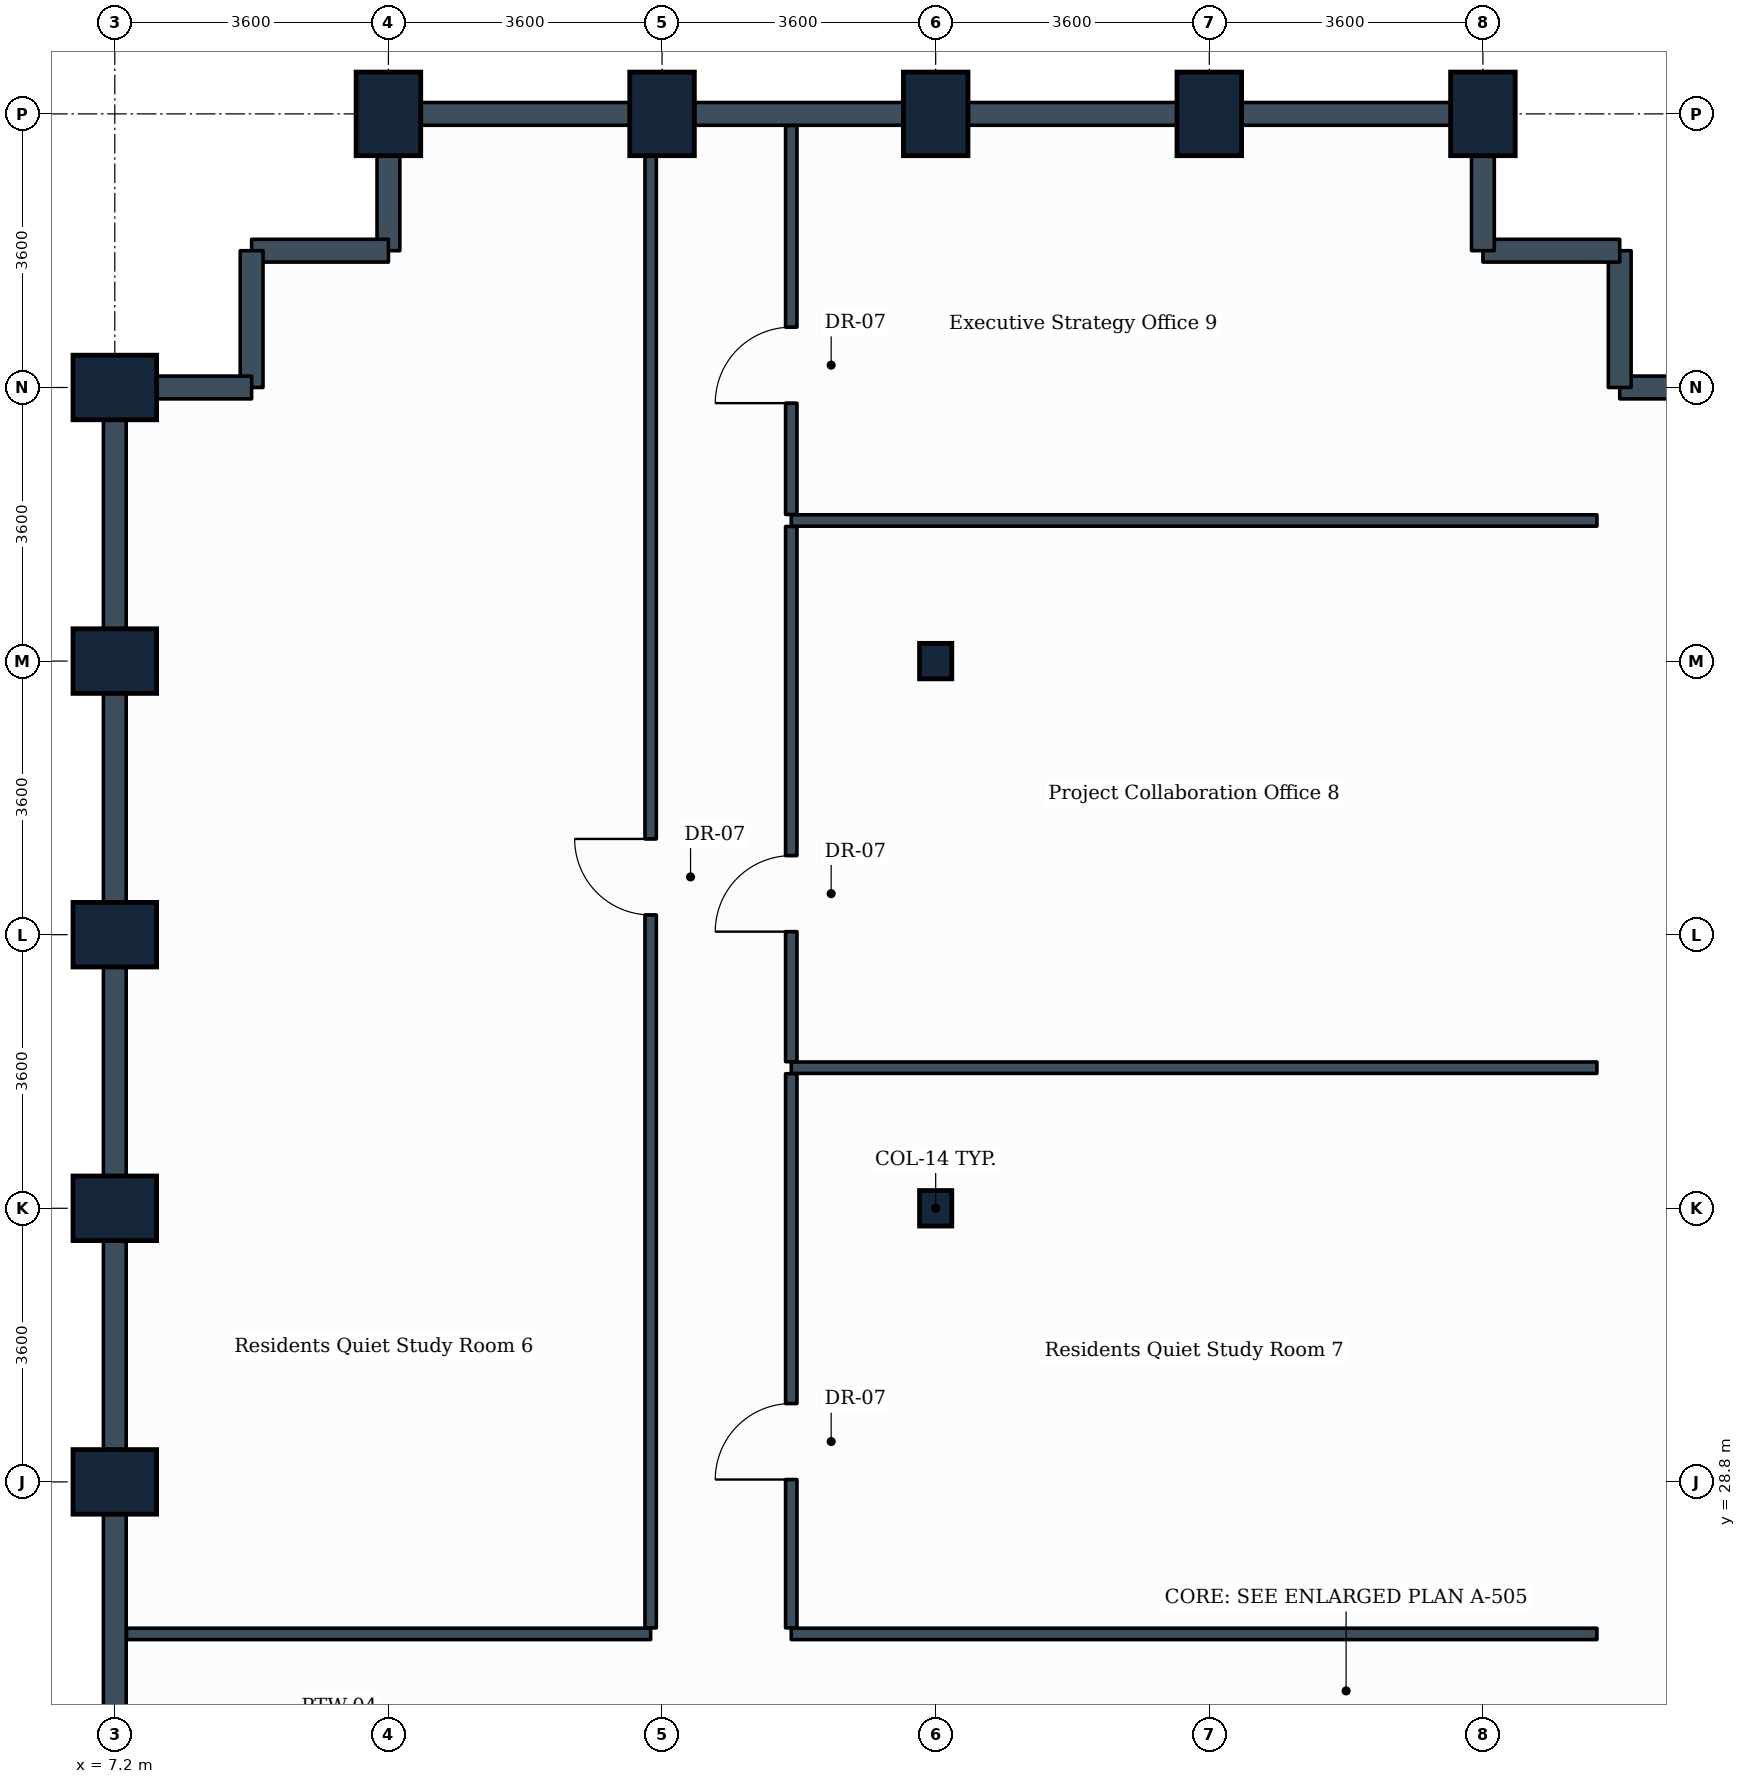
"""IFC4 building model, lengths in metres.
Left out: names, types, materials, properties, quantities, classifications, styles, units other than length and angle.
Written with IfcOpenShell. Run it as: python <this file> out.ifc"""

import sys

from ifc_helpers import new_model, si_unit, direction, frame, frame_2d, origin, origin_2d, place, context, subcontext, project, spatial, rectangle, i_section, extrude, element, fill, save


model = new_model("IFC4")
c1 = context("Model", 3, precision=1e-05, world=origin(), true_north=direction((0.0, 1.0)))
c2 = subcontext(c1, "Body", "Model", "MODEL_VIEW")
j1 = project(units=[si_unit("LENGTHUNIT", "METRE"), si_unit("PLANEANGLEUNIT", "RADIAN")], contexts=[c1])
p1 = place(None, origin())
s1 = spatial("IfcSite", under=j1, at=p1, CompositionType="ELEMENT")
p2 = place(p1, origin())
s2 = spatial("IfcBuilding", under=s1, at=p2, CompositionType="ELEMENT")
p3 = place(p2, frame((0.0, 0.0, 107.4)))
s3 = spatial("IfcBuildingStorey", under=s2, at=p3, CompositionType="ELEMENT", Elevation=107.4)
for number, where, z_axis, x_axis in (
    (1, (7.2, 28.8, 0.0), (0.0, 0.0, 1.0), (0.0, 1.0, 0.0)),
    (2, (7.2, 32.4, 0.0), (0.0, 0.0, 1.0), (0.0, 1.0, 0.0)),
    (3, (7.2, 36.0, 0.0), (0.0, 0.0, 1.0), (0.0, 1.0, 0.0)),
    (4, (7.2, 39.6, 0.0), (0.0, 0.0, 1.0), (0.0, 1.0, 0.0)),
    (5, (7.2, 43.2, 0.0), (0.0, 0.0, 1.0), (0.0, 1.0, 0.0)),
    (6, (10.8, 46.8, 0.0), (0.0, 0.0, 1.0), (1.0, 0.0, 0.0)),
    (7, (14.4, 46.8, 0.0), (0.0, 0.0, 1.0), (1.0, 0.0, 0.0)),
):
    element("IfcColumn", number, at=place(p3, frame(where, z_axis=z_axis, x_axis=x_axis)), inside=s3, PredefinedType="COLUMN", context=c2, shape_type="SweptSolid", body=[
        extrude(rectangle(XDim=0.85, YDim=1.1, at=origin_2d()), origin(), (0.0, 0.0, 1.0), 3.9),
    ])
for number, where, z_axis, x_axis in (
    (8, (18.0, 32.4, 0.0), (0.0, 0.0, 1.0), (1.0, 0.0, 0.0)),
    (9, (18.0, 39.6, 0.0), (0.0, 0.0, 1.0), (1.0, 0.0, 0.0)),
):
    element("IfcColumn", number, at=place(p3, frame(where, z_axis=z_axis, x_axis=x_axis)), inside=s3, PredefinedType="COLUMN", context=c2, shape_type="SweptSolid", body=[
        extrude(i_section(OverallWidth=0.424, OverallDepth=0.467, WebThickness=0.033, FlangeThickness=0.053, FilletRadius=0.015, at=origin_2d()), origin(), (0.0, 0.0, 1.0), 3.9),
    ])
for number, where, z_axis, x_axis in (
    (10, (18.0, 46.8, 0.0), (0.0, 0.0, 1.0), (1.0, 0.0, 0.0)),
    (11, (21.6, 46.8, 0.0), (0.0, 0.0, 1.0), (1.0, 0.0, 0.0)),
    (12, (25.2, 46.8, 0.0), (0.0, 0.0, 1.0), (1.0, 0.0, 0.0)),
):
    element("IfcColumn", number, at=place(p3, frame(where, z_axis=z_axis, x_axis=x_axis)), inside=s3, PredefinedType="COLUMN", context=c2, shape_type="SweptSolid", body=[
        extrude(rectangle(XDim=0.85, YDim=1.1, at=origin_2d()), origin(), (0.0, 0.0, 1.0), 3.9),
    ])
p4 = place(p3, frame((27.0, 43.2, 0.0), z_axis=(0.0, 0.0, 1.0), x_axis=(1.0, 0.0, 0.0)))
e13 = element("IfcWall", 13, at=p4, inside=s3, PredefinedType="STANDARD", context=c2, shape_type="SweptSolid", body=[
    extrude(rectangle(XDim=1.8, YDim=0.3, at=frame_2d((0.9, 0.0))), origin(), (0.0, 0.0, 1.0), 2.93),
])
for number, where, z_axis, x_axis in (
    (14, (27.0, 43.2, 0.0), (0.0, 0.0, 1.0), (0.0, 1.0, 0.0)),
    (15, (25.2, 45.0, 0.0), (0.0, 0.0, 1.0), (1.0, 0.0, 0.0)),
):
    element("IfcWall", number, at=place(p3, frame(where, z_axis=z_axis, x_axis=x_axis)), inside=s3, PredefinedType="STANDARD", context=c2, shape_type="SweptSolid", body=[
        extrude(rectangle(XDim=1.8, YDim=0.3, at=frame_2d((0.9, 0.0))), origin(), (0.0, 0.0, 1.0), 3.635),
    ])
p5 = place(p3, frame((25.2, 45.0, 0.0), z_axis=(0.0, 0.0, 1.0), x_axis=(0.0, 1.0, 0.0)))
e16 = element("IfcWall", 16, at=p5, inside=s3, PredefinedType="STANDARD", context=c2, shape_type="SweptSolid", body=[
    extrude(rectangle(XDim=1.8, YDim=0.3, at=frame_2d((0.9, 0.0))), origin(), (0.0, 0.0, 1.0), 2.93),
])
p6 = place(p3, frame((21.6, 46.8, 0.0), z_axis=(0.0, 0.0, 1.0), x_axis=(1.0, 0.0, 0.0)))
e17 = element("IfcWall", 17, at=p6, inside=s3, PredefinedType="STANDARD", context=c2, shape_type="SweptSolid", body=[
    extrude(rectangle(XDim=3.6, YDim=0.3, at=frame_2d((1.8, 0.0))), origin(), (0.0, 0.0, 1.0), 2.93),
])
for number, where, z_axis, x_axis in (
    (18, (18.0, 46.8, 0.0), (0.0, 0.0, 1.0), (1.0, 0.0, 0.0)),
    (19, (14.4, 46.8, 0.0), (0.0, 0.0, 1.0), (1.0, 0.0, 0.0)),
):
    element("IfcWall", number, at=place(p3, frame(where, z_axis=z_axis, x_axis=x_axis)), inside=s3, PredefinedType="STANDARD", context=c2, shape_type="SweptSolid", body=[
        extrude(rectangle(XDim=3.6, YDim=0.3, at=frame_2d((1.8, 0.0))), origin(), (0.0, 0.0, 1.0), 2.93),
    ])
p7 = place(p3, frame((10.8, 46.8, 0.0), z_axis=(0.0, 0.0, 1.0), x_axis=(1.0, 0.0, 0.0)))
e20 = element("IfcWall", 20, at=p7, inside=s3, PredefinedType="STANDARD", context=c2, shape_type="SweptSolid", body=[
    extrude(rectangle(XDim=3.6, YDim=0.3, at=frame_2d((1.8, 0.0))), origin(), (0.0, 0.0, 1.0), 2.93),
])
p8 = place(p3, frame((10.8, 45.0, 0.0), z_axis=(0.0, 0.0, 1.0), x_axis=(0.0, 1.0, 0.0)))
e21 = element("IfcWall", 21, at=p8, inside=s3, PredefinedType="STANDARD", context=c2, shape_type="SweptSolid", body=[
    extrude(rectangle(XDim=1.8, YDim=0.3, at=frame_2d((0.9, 0.0))), origin(), (0.0, 0.0, 1.0), 2.93),
])
for number, where, z_axis, x_axis in (
    (22, (9.0, 45.0, 0.0), (0.0, 0.0, 1.0), (1.0, 0.0, 0.0)),
    (23, (9.0, 43.2, 0.0), (0.0, 0.0, 1.0), (0.0, 1.0, 0.0)),
):
    element("IfcWall", number, at=place(p3, frame(where, z_axis=z_axis, x_axis=x_axis)), inside=s3, PredefinedType="STANDARD", context=c2, shape_type="SweptSolid", body=[
        extrude(rectangle(XDim=1.8, YDim=0.3, at=frame_2d((0.9, 0.0))), origin(), (0.0, 0.0, 1.0), 3.635),
    ])
p9 = place(p3, frame((7.2, 43.2, 0.0), z_axis=(0.0, 0.0, 1.0), x_axis=(1.0, 0.0, 0.0)))
e24 = element("IfcWall", 24, at=p9, inside=s3, PredefinedType="STANDARD", context=c2, shape_type="SweptSolid", body=[
    extrude(rectangle(XDim=1.8, YDim=0.3, at=frame_2d((0.9, 0.0))), origin(), (0.0, 0.0, 1.0), 2.93),
])
p10 = place(p3, frame((7.2, 39.6, 0.0), z_axis=(0.0, 0.0, 1.0), x_axis=(0.0, 1.0, 0.0)))
e25 = element("IfcWall", 25, at=p10, inside=s3, PredefinedType="STANDARD", context=c2, shape_type="SweptSolid", body=[
    extrude(rectangle(XDim=3.6, YDim=0.3, at=frame_2d((1.8, 0.0))), origin(), (0.0, 0.0, 1.0), 2.93),
])
for number, where, z_axis, x_axis in (
    (26, (7.2, 36.0, 0.0), (0.0, 0.0, 1.0), (0.0, 1.0, 0.0)),
    (27, (7.2, 32.4, 0.0), (0.0, 0.0, 1.0), (0.0, 1.0, 0.0)),
):
    element("IfcWall", number, at=place(p3, frame(where, z_axis=z_axis, x_axis=x_axis)), inside=s3, PredefinedType="STANDARD", context=c2, shape_type="SweptSolid", body=[
        extrude(rectangle(XDim=3.6, YDim=0.3, at=frame_2d((1.8, 0.0))), origin(), (0.0, 0.0, 1.0), 2.93),
    ])
p11 = place(p3, frame((7.2, 28.8, 0.0), z_axis=(0.0, 0.0, 1.0), x_axis=(0.0, 1.0, 0.0)))
e28 = element("IfcWall", 28, at=p11, inside=s3, PredefinedType="STANDARD", context=c2, shape_type="SweptSolid", body=[
    extrude(rectangle(XDim=3.6, YDim=0.3, at=frame_2d((1.8, 0.0))), origin(), (0.0, 0.0, 1.0), 2.93),
])
p12 = place(p3, frame((7.2, 25.2, 0.0), z_axis=(0.0, 0.0, 1.0), x_axis=(0.0, 1.0, 0.0)))
e29 = element("IfcWall", 29, at=p12, inside=s3, PredefinedType="STANDARD", context=c2, shape_type="SweptSolid", body=[
    extrude(rectangle(XDim=3.6, YDim=0.3, at=frame_2d((1.8, 0.0))), origin(), (0.0, 0.0, 1.0), 2.93),
])
p13 = place(p3, frame((7.354, 26.8, 0.0), z_axis=(0.0, 0.0, 1.0), x_axis=(1.0, 0.0, 0.0)))
e30 = element("IfcWall", 30, at=p13, inside=s3, PredefinedType="PARTITIONING", context=c2, shape_type="SweptSolid", body=[
    extrude(rectangle(XDim=6.896, YDim=0.15, at=frame_2d((3.448, 0.0))), origin(), (0.0, 0.0, 1.0), 2.93),
])
p14 = place(p3, frame((14.25, 26.879, 0.0), z_axis=(0.0, 0.0, 1.0), x_axis=(0.0, 1.0, 0.0)))
e31 = element("IfcWall", 31, at=p14, inside=s3, PredefinedType="PARTITIONING", context=c2, shape_type="SweptSolid", body=[
    extrude(rectangle(XDim=19.767, YDim=0.15, at=frame_2d((9.884, 0.0))), origin(), (0.0, 0.0, 1.0), 2.93),
])
p15 = place(p14, frame((9.381, 0.0, 0.0)))
e32 = element("IfcOpeningElement", 32, at=p15, cuts=e31, PredefinedType="OPENING", context=c2, shape_type="SweptSolid", body=[
    extrude(rectangle(XDim=1.0, YDim=2.1, at=frame_2d((0.5, 1.05))), frame((0.0, 0.085, 0.0), z_axis=(0.0, -1.0, 0.0), x_axis=(1.0, 0.0, 0.0)), (0.0, 0.0, 1.0), 0.17),
])
for number, where, z_axis, x_axis in (
    (33, (16.1, 26.8, 0.0), (0.0, 0.0, 1.0), (1.0, 0.0, 0.0)),
    (34, (16.1, 34.25, 0.0), (0.0, 0.0, 1.0), (1.0, 0.0, 0.0)),
):
    element("IfcWall", number, at=place(p3, frame(where, z_axis=z_axis, x_axis=x_axis)), inside=s3, PredefinedType="PARTITIONING", context=c2, shape_type="SweptSolid", body=[
        extrude(rectangle(XDim=10.6, YDim=0.15, at=frame_2d((5.3, 0.0))), origin(), (0.0, 0.0, 1.0), 3.18),
    ])
p16 = place(p3, frame((16.1, 26.879, 0.0), z_axis=(0.0, 0.0, 1.0), x_axis=(0.0, 1.0, 0.0)))
e35 = element("IfcWall", 35, at=p16, inside=s3, PredefinedType="PARTITIONING", context=c2, shape_type="SweptSolid", body=[
    extrude(rectangle(XDim=7.292, YDim=0.15, at=frame_2d((3.646, 0.0))), origin(), (0.0, 0.0, 1.0), 3.19),
])
p17 = place(p16, frame((1.952, 0.0, 0.0)))
e36 = element("IfcOpeningElement", 36, at=p17, cuts=e35, PredefinedType="OPENING", context=c2, shape_type="SweptSolid", body=[
    extrude(rectangle(XDim=1.0, YDim=2.1, at=frame_2d((0.5, 1.05))), frame((0.0, 0.085, 0.0), z_axis=(0.0, -1.0, 0.0), x_axis=(1.0, 0.0, 0.0)), (0.0, 0.0, 1.0), 0.17),
])
p18 = place(p3, frame((16.1, 41.45, 0.0), z_axis=(0.0, 0.0, 1.0), x_axis=(1.0, 0.0, 0.0)))
e37 = element("IfcWall", 37, at=p18, inside=s3, PredefinedType="PARTITIONING", context=c2, shape_type="SweptSolid", body=[
    extrude(rectangle(XDim=10.6, YDim=0.15, at=frame_2d((5.3, 0.0))), origin(), (0.0, 0.0, 1.0), 3.18),
])
p19 = place(p3, frame((16.1, 34.329, 0.0), z_axis=(0.0, 0.0, 1.0), x_axis=(0.0, 1.0, 0.0)))
e38 = element("IfcWall", 38, at=p19, inside=s3, PredefinedType="PARTITIONING", context=c2, shape_type="SweptSolid", body=[
    extrude(rectangle(XDim=7.042, YDim=0.15, at=frame_2d((3.521, 0.0))), origin(), (0.0, 0.0, 1.0), 3.19),
])
p20 = place(p19, frame((1.711, 0.0, 0.0)))
e39 = element("IfcOpeningElement", 39, at=p20, cuts=e38, PredefinedType="OPENING", context=c2, shape_type="SweptSolid", body=[
    extrude(rectangle(XDim=1.0, YDim=2.1, at=frame_2d((0.5, 1.05))), frame((0.0, 0.085, 0.0), z_axis=(0.0, -1.0, 0.0), x_axis=(1.0, 0.0, 0.0)), (0.0, 0.0, 1.0), 0.17),
])
p21 = place(p3, frame((16.1, 41.529, 0.0), z_axis=(0.0, 0.0, 1.0), x_axis=(0.0, 1.0, 0.0)))
e40 = element("IfcWall", 40, at=p21, inside=s3, PredefinedType="PARTITIONING", context=c2, shape_type="SweptSolid", body=[
    extrude(rectangle(XDim=5.117, YDim=0.15, at=frame_2d((2.559, 0.0))), origin(), (0.0, 0.0, 1.0), 2.93),
])
p22 = place(p21, frame((1.465, 0.0, 0.0)))
e41 = element("IfcOpeningElement", 41, at=p22, cuts=e40, PredefinedType="OPENING", context=c2, shape_type="SweptSolid", body=[
    extrude(rectangle(XDim=1.0, YDim=2.1, at=frame_2d((0.5, 1.05))), frame((0.0, 0.085, 0.0), z_axis=(0.0, -1.0, 0.0), x_axis=(1.0, 0.0, 0.0)), (0.0, 0.0, 1.0), 0.17),
])
p23 = place(p15, origin())
e42 = element("IfcDoor", 42, at=p23, inside=s3, OperationType="SINGLE_SWING_RIGHT", PredefinedType="DOOR", context=c2, shape_type="SweptSolid", body=[
    extrude(rectangle(XDim=1.0, YDim=2.1, at=frame_2d((0.5, 1.05))), frame((0.0, 0.025, 0.0), z_axis=(0.0, -1.0, 0.0), x_axis=(1.0, 0.0, 0.0)), (0.0, 0.0, 1.0), 0.05),
])
fill(e32, e42)
p24 = place(p17, origin())
e43 = element("IfcDoor", 43, at=p24, inside=s3, OperationType="SINGLE_SWING_LEFT", PredefinedType="DOOR", context=c2, shape_type="SweptSolid", body=[
    extrude(rectangle(XDim=1.0, YDim=2.1, at=frame_2d((0.5, 1.05))), frame((0.0, 0.025, 0.0), z_axis=(0.0, -1.0, 0.0), x_axis=(1.0, 0.0, 0.0)), (0.0, 0.0, 1.0), 0.05),
])
fill(e36, e43)
p25 = place(p20, origin())
e44 = element("IfcDoor", 44, at=p25, inside=s3, OperationType="SINGLE_SWING_LEFT", PredefinedType="DOOR", context=c2, shape_type="SweptSolid", body=[
    extrude(rectangle(XDim=1.0, YDim=2.1, at=frame_2d((0.5, 1.05))), frame((0.0, 0.025, 0.0), z_axis=(0.0, -1.0, 0.0), x_axis=(1.0, 0.0, 0.0)), (0.0, 0.0, 1.0), 0.05),
])
fill(e39, e44)
p26 = place(p22, origin())
e45 = element("IfcDoor", 45, at=p26, inside=s3, OperationType="SINGLE_SWING_LEFT", PredefinedType="DOOR", context=c2, shape_type="SweptSolid", body=[
    extrude(rectangle(XDim=1.0, YDim=2.1, at=frame_2d((0.5, 1.05))), frame((0.0, 0.025, 0.0), z_axis=(0.0, -1.0, 0.0), x_axis=(1.0, 0.0, 0.0)), (0.0, 0.0, 1.0), 0.05),
])
fill(e41, e45)
save(model, sys.argv[1])
